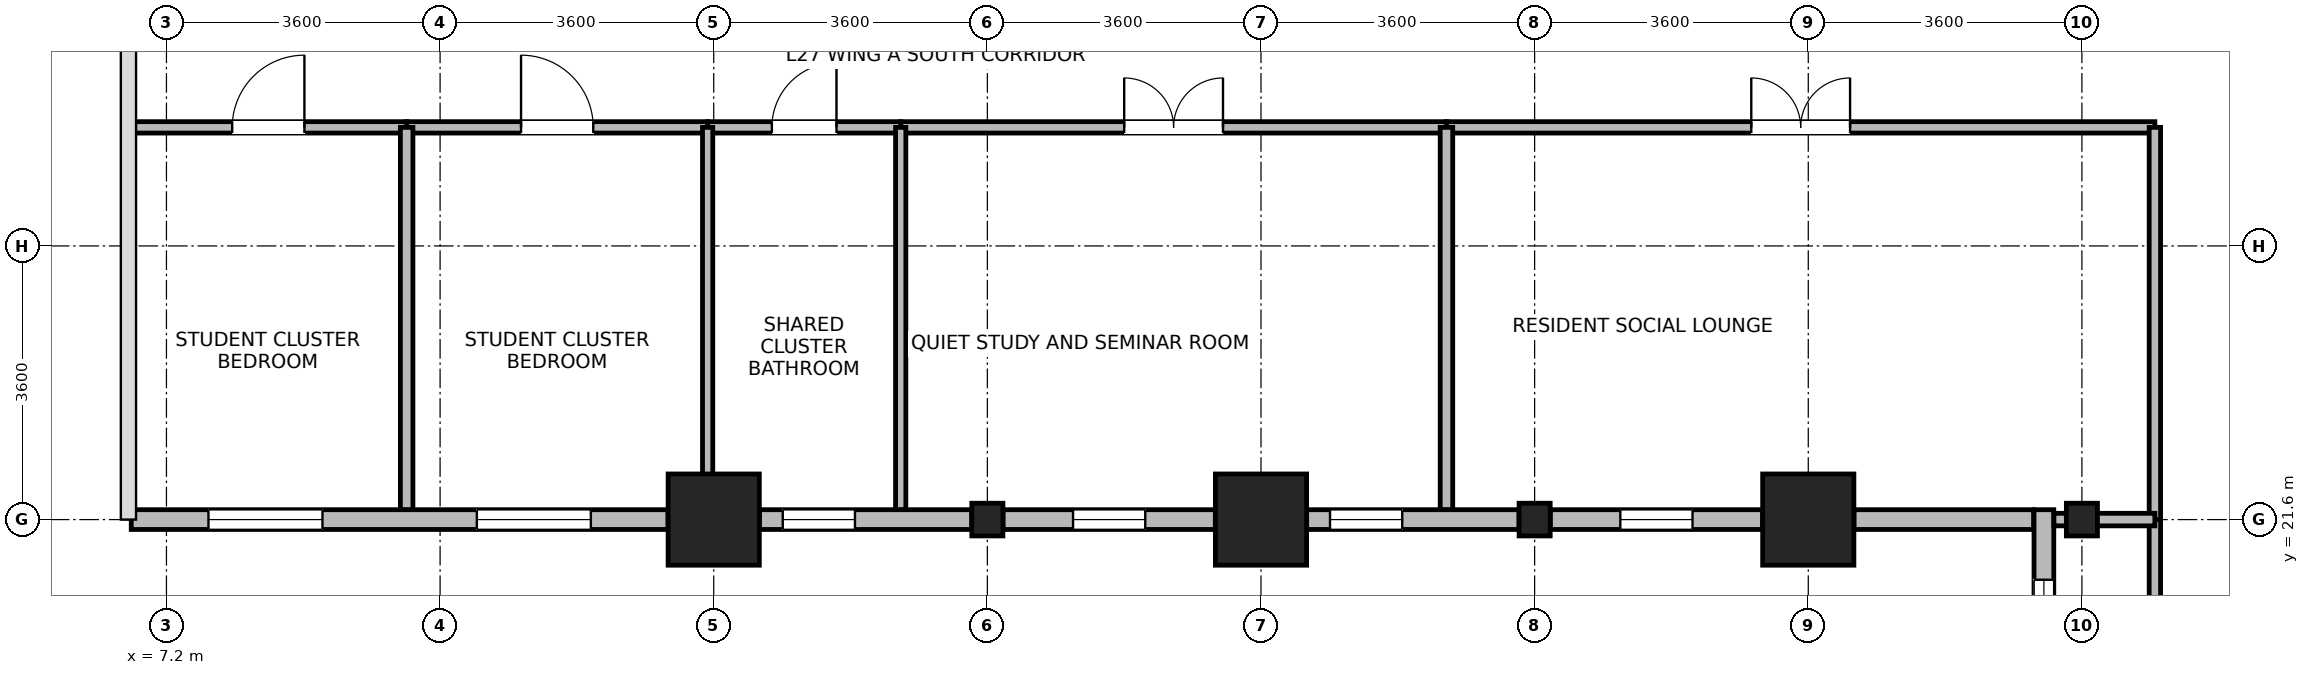
"""IFC4 building model, lengths in metres.
Left out: names, types, materials, properties, quantities, classifications, styles, units other than length and angle.
Written with IfcOpenShell. Run it as: python <this file> out.ifc"""

import sys

from ifc_helpers import new_model, si_unit, direction, frame, frame_2d, origin, origin_2d, place, context, subcontext, project, spatial, rectangle, i_section, extrude, source, transform, mapped, element, fill, save


model = new_model("IFC4")
c1 = context("Model", 3, precision=1e-05, world=origin(), true_north=direction((0.0, 1.0)))
c2 = subcontext(c1, "Body", "Model", "MODEL_VIEW")
j1 = project(units=[si_unit("LENGTHUNIT", "METRE"), si_unit("PLANEANGLEUNIT", "RADIAN")], contexts=[c1])
p1 = place(None, origin())
s1 = spatial("IfcSite", under=j1, at=p1, CompositionType="ELEMENT")
p2 = place(p1, origin())
s2 = spatial("IfcBuilding", under=s1, at=p2, CompositionType="ELEMENT")
p3 = place(p2, frame((0.0, 0.0, 108.2)))
s3 = spatial("IfcBuildingStorey", under=s2, at=p3, CompositionType="ELEMENT", Elevation=108.2)
m1 = source(origin(), c2, "Body", "SweptSolid", [
    extrude(rectangle(XDim=1.2, YDim=1.2, at=origin_2d()), origin(), (0.0, 0.0, 1.0), 3.7),
])
for number, where, z_axis, x_axis in (
    (1, (14.4, 21.6, 0.0), (0.0, 0.0, 1.0), (1.0, 0.0, 0.0)),
    (2, (21.6, 21.6, 0.0), (0.0, 0.0, 1.0), (1.0, 0.0, 0.0)),
    (3, (28.8, 21.6, 0.0), (0.0, 0.0, 1.0), (1.0, 0.0, 0.0)),
):
    element("IfcColumn", number, at=place(p3, frame(where, z_axis=z_axis, x_axis=x_axis)), inside=s3, PredefinedType="COLUMN", context=c2, shape_type="MappedRepresentation", body=[
        mapped(m1, transform((0.0, 0.0, 0.0), x_axis=(1.0, 0.0, 0.0), y_axis=(0.0, 1.0, 0.0), z_axis=(0.0, 0.0, 1.0), scale=1.0)),
    ])
m2 = source(origin(), c2, "Body", "SweptSolid", [
    extrude(i_section(OverallWidth=0.409, OverallDepth=0.43, WebThickness=0.024, FlangeThickness=0.033, FilletRadius=0.015, at=origin_2d()), origin(), (0.0, 0.0, 1.0), 3.7),
])
for number, where, z_axis, x_axis in (
    (4, (18.0, 21.6, 0.0), (0.0, 0.0, 1.0), (1.0, 0.0, 0.0)),
    (5, (25.2, 21.6, 0.0), (0.0, 0.0, 1.0), (1.0, 0.0, 0.0)),
    (6, (32.4, 21.6, 0.0), (0.0, 0.0, 1.0), (1.0, 0.0, 0.0)),
):
    element("IfcColumn", number, at=place(p3, frame(where, z_axis=z_axis, x_axis=x_axis)), inside=s3, PredefinedType="COLUMN", context=c2, shape_type="MappedRepresentation", body=[
        mapped(m2, transform((0.0, 0.0, 0.0), x_axis=(1.0, 0.0, 0.0), y_axis=(0.0, 1.0, 0.0), z_axis=(0.0, 0.0, 1.0), scale=1.0)),
    ])
p4 = place(p3, frame((13.799, 21.6, 0.0), z_axis=(0.0, 0.0, 1.0), x_axis=(-1.0, 0.0, 0.0)))
e7 = element("IfcWall", 7, at=p4, inside=s3, PredefinedType="STANDARD", context=c2, shape_type="SweptSolid", body=[
    extrude(rectangle(XDim=7.062, YDim=0.26, at=frame_2d((3.531, 0.0))), origin(), (0.0, 0.0, 1.0), 3.43),
])
p5 = place(p4, frame((1.015, 0.0, 0.85)))
e8 = element("IfcOpeningElement", 8, at=p5, cuts=e7, PredefinedType="OPENING", context=c2, shape_type="SweptSolid", body=[
    extrude(rectangle(XDim=1.5, YDim=1.85, at=frame_2d((0.75, 0.925))), frame((0.0, 0.14, 0.0), z_axis=(0.0, -1.0, 0.0), x_axis=(1.0, 0.0, 0.0)), (0.0, 0.0, 1.0), 0.28),
])
p6 = place(p4, frame((4.546, 0.0, 0.85)))
e9 = element("IfcOpeningElement", 9, at=p6, cuts=e7, PredefinedType="OPENING", context=c2, shape_type="SweptSolid", body=[
    extrude(rectangle(XDim=1.5, YDim=1.85, at=frame_2d((0.75, 0.925))), frame((0.0, 0.14, 0.0), z_axis=(0.0, -1.0, 0.0), x_axis=(1.0, 0.0, 0.0)), (0.0, 0.0, 1.0), 0.28),
])
p7 = place(p3, frame((17.794, 21.6, 0.0), z_axis=(0.0, 0.0, 1.0), x_axis=(-1.0, 0.0, 0.0)))
e10 = element("IfcWall", 10, at=p7, inside=s3, PredefinedType="STANDARD", context=c2, shape_type="SweptSolid", body=[
    extrude(rectangle(XDim=2.793, YDim=0.26, at=frame_2d((1.397, 0.0))), origin(), (0.0, 0.0, 1.0), 2.98),
])
p8 = place(p7, frame((1.536, 0.0, 0.85)))
e11 = element("IfcOpeningElement", 11, at=p8, cuts=e10, PredefinedType="OPENING", context=c2, shape_type="SweptSolid", body=[
    extrude(rectangle(XDim=0.95, YDim=1.75, at=frame_2d((0.475, 0.875))), frame((0.0, 0.14, 0.0), z_axis=(0.0, -1.0, 0.0), x_axis=(1.0, 0.0, 0.0)), (0.0, 0.0, 1.0), 0.28),
])
p9 = place(p3, frame((20.999, 21.6, 0.0), z_axis=(0.0, 0.0, 1.0), x_axis=(-1.0, 0.0, 0.0)))
e12 = element("IfcWall", 12, at=p9, inside=s3, PredefinedType="STANDARD", context=c2, shape_type="SweptSolid", body=[
    extrude(rectangle(XDim=2.793, YDim=0.26, at=frame_2d((1.397, 0.0))), origin(), (0.0, 0.0, 1.0), 2.98),
])
p10 = place(p9, frame((0.922, 0.0, 0.85)))
e13 = element("IfcOpeningElement", 13, at=p10, cuts=e12, PredefinedType="OPENING", context=c2, shape_type="SweptSolid", body=[
    extrude(rectangle(XDim=0.95, YDim=1.75, at=frame_2d((0.475, 0.875))), frame((0.0, 0.14, 0.0), z_axis=(0.0, -1.0, 0.0), x_axis=(1.0, 0.0, 0.0)), (0.0, 0.0, 1.0), 0.28),
])
p11 = place(p3, frame((24.994, 21.6, 0.0), z_axis=(0.0, 0.0, 1.0), x_axis=(-1.0, 0.0, 0.0)))
e14 = element("IfcWall", 14, at=p11, inside=s3, PredefinedType="STANDARD", context=c2, shape_type="SweptSolid", body=[
    extrude(rectangle(XDim=2.793, YDim=0.26, at=frame_2d((1.397, 0.0))), origin(), (0.0, 0.0, 1.0), 2.98),
])
p12 = place(p11, frame((1.536, 0.0, 0.85)))
e15 = element("IfcOpeningElement", 15, at=p12, cuts=e14, PredefinedType="OPENING", context=c2, shape_type="SweptSolid", body=[
    extrude(rectangle(XDim=0.95, YDim=1.75, at=frame_2d((0.475, 0.875))), frame((0.0, 0.14, 0.0), z_axis=(0.0, -1.0, 0.0), x_axis=(1.0, 0.0, 0.0)), (0.0, 0.0, 1.0), 0.28),
])
p13 = place(p3, frame((28.199, 21.6, 0.0), z_axis=(0.0, 0.0, 1.0), x_axis=(-1.0, 0.0, 0.0)))
e16 = element("IfcWall", 16, at=p13, inside=s3, PredefinedType="STANDARD", context=c2, shape_type="SweptSolid", body=[
    extrude(rectangle(XDim=2.793, YDim=0.26, at=frame_2d((1.397, 0.0))), origin(), (0.0, 0.0, 1.0), 2.98),
])
p14 = place(p13, frame((0.922, 0.0, 0.85)))
e17 = element("IfcOpeningElement", 17, at=p14, cuts=e16, PredefinedType="OPENING", context=c2, shape_type="SweptSolid", body=[
    extrude(rectangle(XDim=0.95, YDim=1.75, at=frame_2d((0.475, 0.875))), frame((0.0, 0.14, 0.0), z_axis=(0.0, -1.0, 0.0), x_axis=(1.0, 0.0, 0.0)), (0.0, 0.0, 1.0), 0.28),
])
p15 = place(p3, frame((31.765, 21.6, 0.0), z_axis=(0.0, 0.0, 1.0), x_axis=(-1.0, 0.0, 0.0)))
e18 = element("IfcWall", 18, at=p15, inside=s3, PredefinedType="STANDARD", context=c2, shape_type="SweptSolid", body=[
    extrude(rectangle(XDim=2.364, YDim=0.26, at=frame_2d((1.182, 0.0))), origin(), (0.0, 0.0, 1.0), 2.98),
])
p16 = place(p3, frame((31.9, 1.67, 0.0), z_axis=(0.0, 0.0, 1.0), x_axis=(0.0, 1.0, 0.0)))
e19 = element("IfcWall", 19, at=p16, inside=s3, PredefinedType="STANDARD", context=c2, shape_type="SweptSolid", body=[
    extrude(rectangle(XDim=20.06, YDim=0.26, at=frame_2d((10.03, 0.0))), origin(), (0.0, 0.0, 1.0), 3.43),
])
p17 = place(p16, frame((0.922, 0.0, 0.85)))
e20 = element("IfcOpeningElement", 20, at=p17, cuts=e19, PredefinedType="OPENING", context=c2, shape_type="SweptSolid", body=[
    extrude(rectangle(XDim=1.5, YDim=1.85, at=frame_2d((0.75, 0.925))), frame((0.0, 0.14, 0.0), z_axis=(0.0, -1.0, 0.0), x_axis=(1.0, 0.0, 0.0)), (0.0, 0.0, 1.0), 0.28),
])
p18 = place(p16, frame((7.608, 0.0, 0.85)))
e21 = element("IfcOpeningElement", 21, at=p18, cuts=e19, PredefinedType="OPENING", context=c2, shape_type="SweptSolid", body=[
    extrude(rectangle(XDim=1.5, YDim=1.85, at=frame_2d((0.75, 0.925))), frame((0.0, 0.14, 0.0), z_axis=(0.0, -1.0, 0.0), x_axis=(1.0, 0.0, 0.0)), (0.0, 0.0, 1.0), 0.28),
])
p19 = place(p16, frame((10.952, 0.0, 0.85)))
e22 = element("IfcOpeningElement", 22, at=p19, cuts=e19, PredefinedType="OPENING", context=c2, shape_type="SweptSolid", body=[
    extrude(rectangle(XDim=1.5, YDim=1.85, at=frame_2d((0.75, 0.925))), frame((0.0, 0.14, 0.0), z_axis=(0.0, -1.0, 0.0), x_axis=(1.0, 0.0, 0.0)), (0.0, 0.0, 1.0), 0.28),
])
p20 = place(p16, frame((14.295, 0.0, 0.85)))
e23 = element("IfcOpeningElement", 23, at=p20, cuts=e19, PredefinedType="OPENING", context=c2, shape_type="SweptSolid", body=[
    extrude(rectangle(XDim=1.5, YDim=1.85, at=frame_2d((0.75, 0.925))), frame((0.0, 0.14, 0.0), z_axis=(0.0, -1.0, 0.0), x_axis=(1.0, 0.0, 0.0)), (0.0, 0.0, 1.0), 0.28),
])
p21 = place(p16, frame((17.638, 0.0, 0.85)))
e24 = element("IfcOpeningElement", 24, at=p21, cuts=e19, PredefinedType="OPENING", context=c2, shape_type="SweptSolid", body=[
    extrude(rectangle(XDim=1.5, YDim=1.85, at=frame_2d((0.75, 0.925))), frame((0.0, 0.14, 0.0), z_axis=(0.0, -1.0, 0.0), x_axis=(1.0, 0.0, 0.0)), (0.0, 0.0, 1.0), 0.28),
])
p22 = place(p3, frame((24.04, 26.76, 0.0), z_axis=(0.0, 0.0, 1.0), x_axis=(1.0, 0.0, 0.0)))
e25 = element("IfcWall", 25, at=p22, inside=s3, PredefinedType="PARTITIONING", context=c2, shape_type="SweptSolid", body=[
    extrude(rectangle(XDim=9.32, YDim=0.15, at=frame_2d((4.66, 0.0))), origin(), (0.0, 0.0, 1.0), 3.43),
])
p23 = place(p22, frame((4.01, 0.0, 0.0)))
e26 = element("IfcOpeningElement", 26, at=p23, cuts=e25, PredefinedType="OPENING", context=c2, shape_type="SweptSolid", body=[
    extrude(rectangle(XDim=1.3, YDim=2.12, at=frame_2d((0.65, 1.06))), frame((0.0, 0.085, 0.0), z_axis=(0.0, -1.0, 0.0), x_axis=(1.0, 0.0, 0.0)), (0.0, 0.0, 1.0), 0.17),
])
p24 = place(p3, frame((16.86, 26.76, 0.0), z_axis=(0.0, 0.0, 1.0), x_axis=(1.0, 0.0, 0.0)))
e27 = element("IfcWall", 27, at=p24, inside=s3, PredefinedType="PARTITIONING", context=c2, shape_type="SweptSolid", body=[
    extrude(rectangle(XDim=7.18, YDim=0.15, at=frame_2d((3.59, 0.0))), origin(), (0.0, 0.0, 1.0), 3.43),
])
p25 = place(p24, frame((2.94, 0.0, 0.0)))
e28 = element("IfcOpeningElement", 28, at=p25, cuts=e27, PredefinedType="OPENING", context=c2, shape_type="SweptSolid", body=[
    extrude(rectangle(XDim=1.3, YDim=2.12, at=frame_2d((0.65, 1.06))), frame((0.0, 0.085, 0.0), z_axis=(0.0, -1.0, 0.0), x_axis=(1.0, 0.0, 0.0)), (0.0, 0.0, 1.0), 0.17),
])
p26 = place(p3, frame((33.36, 14.5, 0.0), z_axis=(0.0, 0.0, 1.0), x_axis=(0.0, 1.0, 0.0)))
e29 = element("IfcWall", 29, at=p26, inside=s3, PredefinedType="PARTITIONING", context=c2, shape_type="SweptSolid", body=[
    extrude(rectangle(XDim=7.1, YDim=0.15, at=frame_2d((3.55, 0.0))), origin(), (0.0, 0.0, 1.0), 3.43),
])
p27 = place(p26, frame((2.9, 0.0, 0.0)))
e30 = element("IfcOpeningElement", 30, at=p27, cuts=e29, PredefinedType="OPENING", context=c2, shape_type="SweptSolid", body=[
    extrude(rectangle(XDim=1.3, YDim=2.12, at=frame_2d((0.65, 1.06))), frame((0.0, 0.085, 0.0), z_axis=(0.0, -1.0, 0.0), x_axis=(1.0, 0.0, 0.0)), (0.0, 0.0, 1.0), 0.17),
])
p28 = place(p3, frame((33.36, 21.6, 0.0), z_axis=(0.0, 0.0, 1.0), x_axis=(0.0, 1.0, 0.0)))
e31 = element("IfcWall", 31, at=p28, inside=s3, PredefinedType="PARTITIONING", context=c2, shape_type="SweptSolid", body=[
    extrude(rectangle(XDim=5.16, YDim=0.15, at=frame_2d((2.58, 0.0))), origin(), (0.0, 0.0, 1.0), 3.43),
])
p29 = place(p3, frame((10.36, 26.76, 0.0), z_axis=(0.0, 0.0, 1.0), x_axis=(1.0, 0.0, 0.0)))
e32 = element("IfcWall", 32, at=p29, inside=s3, PredefinedType="PARTITIONING", context=c2, shape_type="SweptSolid", body=[
    extrude(rectangle(XDim=3.96, YDim=0.15, at=frame_2d((1.98, 0.0))), origin(), (0.0, 0.0, 1.0), 3.43),
])
p30 = place(p29, frame((1.505, 0.0, 0.0)))
e33 = element("IfcOpeningElement", 33, at=p30, cuts=e32, PredefinedType="OPENING", context=c2, shape_type="SweptSolid", body=[
    extrude(rectangle(XDim=0.95, YDim=2.1, at=frame_2d((0.475, 1.05))), frame((0.0, 0.085, 0.0), z_axis=(0.0, -1.0, 0.0), x_axis=(1.0, 0.0, 0.0)), (0.0, 0.0, 1.0), 0.17),
])
p31 = place(p3, frame((6.72, 26.76, 0.0), z_axis=(0.0, 0.0, 1.0), x_axis=(1.0, 0.0, 0.0)))
e34 = element("IfcWall", 34, at=p31, inside=s3, PredefinedType="PARTITIONING", context=c2, shape_type="SweptSolid", body=[
    extrude(rectangle(XDim=3.64, YDim=0.15, at=frame_2d((1.82, 0.0))), origin(), (0.0, 0.0, 1.0), 3.43),
])
p32 = place(p31, frame((1.345, 0.0, 0.0)))
e35 = element("IfcOpeningElement", 35, at=p32, cuts=e34, PredefinedType="OPENING", context=c2, shape_type="SweptSolid", body=[
    extrude(rectangle(XDim=0.95, YDim=2.1, at=frame_2d((0.475, 1.05))), frame((0.0, 0.085, 0.0), z_axis=(0.0, -1.0, 0.0), x_axis=(1.0, 0.0, 0.0)), (0.0, 0.0, 1.0), 0.17),
])
p33 = place(p3, frame((14.32, 26.76, 0.0), z_axis=(0.0, 0.0, 1.0), x_axis=(1.0, 0.0, 0.0)))
e36 = element("IfcWall", 36, at=p33, inside=s3, PredefinedType="PARTITIONING", context=c2, shape_type="SweptSolid", body=[
    extrude(rectangle(XDim=2.54, YDim=0.15, at=frame_2d((1.27, 0.0))), origin(), (0.0, 0.0, 1.0), 3.43),
])
p34 = place(p33, frame((0.845, 0.0, 0.0)))
e37 = element("IfcOpeningElement", 37, at=p34, cuts=e36, PredefinedType="OPENING", context=c2, shape_type="SweptSolid", body=[
    extrude(rectangle(XDim=0.85, YDim=2.04, at=frame_2d((0.425, 1.02))), frame((0.0, 0.085, 0.0), z_axis=(0.0, -1.0, 0.0), x_axis=(1.0, 0.0, 0.0)), (0.0, 0.0, 1.0), 0.17),
])
p35 = place(p3, frame((10.36, 21.732, 0.0), z_axis=(0.0, 0.0, 1.0), x_axis=(0.0, 1.0, 0.0)))
e38 = element("IfcWall", 38, at=p35, inside=s3, PredefinedType="PARTITIONING", context=c2, shape_type="SweptSolid", body=[
    extrude(rectangle(XDim=5.028, YDim=0.165, at=frame_2d((2.514, 0.0))), origin(), (0.0, 0.0, 1.0), 3.43),
])
p36 = place(p3, frame((14.32, 21.732, 0.0), z_axis=(0.0, 0.0, 1.0), x_axis=(0.0, 1.0, 0.0)))
e39 = element("IfcWall", 39, at=p36, inside=s3, PredefinedType="PARTITIONING", context=c2, shape_type="SweptSolid", body=[
    extrude(rectangle(XDim=5.028, YDim=0.135, at=frame_2d((2.514, 0.0))), origin(), (0.0, 0.0, 1.0), 2.93),
])
p37 = place(p3, frame((16.86, 21.732, 0.0), z_axis=(0.0, 0.0, 1.0), x_axis=(0.0, 1.0, 0.0)))
e40 = element("IfcWall", 40, at=p37, inside=s3, PredefinedType="PARTITIONING", context=c2, shape_type="SweptSolid", body=[
    extrude(rectangle(XDim=5.028, YDim=0.135, at=frame_2d((2.514, 0.0))), origin(), (0.0, 0.0, 1.0), 3.43),
])
p38 = place(p3, frame((24.04, 21.732, 0.0), z_axis=(0.0, 0.0, 1.0), x_axis=(0.0, 1.0, 0.0)))
e41 = element("IfcWall", 41, at=p38, inside=s3, PredefinedType="PARTITIONING", context=c2, shape_type="SweptSolid", body=[
    extrude(rectangle(XDim=5.028, YDim=0.165, at=frame_2d((2.514, 0.0))), origin(), (0.0, 0.0, 1.0), 3.43),
])
p39 = place(p3, frame((32.032, 21.6, 0.0), z_axis=(0.0, 0.0, 1.0), x_axis=(1.0, 0.0, 0.0)))
e42 = element("IfcWall", 42, at=p39, inside=s3, PredefinedType="PARTITIONING", context=c2, shape_type="SweptSolid", body=[
    extrude(rectangle(XDim=1.328, YDim=0.165, at=frame_2d((0.664, 0.0))), origin(), (0.0, 0.0, 1.0), 2.98),
])
p40 = place(p5, origin())
e43 = element("IfcWindow", 43, at=p40, inside=s3, PartitioningType="SINGLE_PANEL", PredefinedType="WINDOW", context=c2, shape_type="SweptSolid", body=[
    extrude(rectangle(XDim=1.5, YDim=1.85, at=frame_2d((0.75, 0.925))), frame((0.0, 0.03, 0.0), z_axis=(0.0, -1.0, 0.0), x_axis=(1.0, 0.0, 0.0)), (0.0, 0.0, 1.0), 0.06),
])
fill(e8, e43)
p41 = place(p6, origin())
e44 = element("IfcWindow", 44, at=p41, inside=s3, PartitioningType="SINGLE_PANEL", PredefinedType="WINDOW", context=c2, shape_type="SweptSolid", body=[
    extrude(rectangle(XDim=1.5, YDim=1.85, at=frame_2d((0.75, 0.925))), frame((0.0, 0.03, 0.0), z_axis=(0.0, -1.0, 0.0), x_axis=(1.0, 0.0, 0.0)), (0.0, 0.0, 1.0), 0.06),
])
fill(e9, e44)
p42 = place(p8, origin())
e45 = element("IfcWindow", 45, at=p42, inside=s3, PartitioningType="SINGLE_PANEL", PredefinedType="WINDOW", context=c2, shape_type="SweptSolid", body=[
    extrude(rectangle(XDim=0.95, YDim=1.75, at=frame_2d((0.475, 0.875))), frame((0.0, 0.03, 0.0), z_axis=(0.0, -1.0, 0.0), x_axis=(1.0, 0.0, 0.0)), (0.0, 0.0, 1.0), 0.06),
])
fill(e11, e45)
p43 = place(p10, origin())
e46 = element("IfcWindow", 46, at=p43, inside=s3, PartitioningType="SINGLE_PANEL", PredefinedType="WINDOW", context=c2, shape_type="SweptSolid", body=[
    extrude(rectangle(XDim=0.95, YDim=1.75, at=frame_2d((0.475, 0.875))), frame((0.0, 0.03, 0.0), z_axis=(0.0, -1.0, 0.0), x_axis=(1.0, 0.0, 0.0)), (0.0, 0.0, 1.0), 0.06),
])
fill(e13, e46)
p44 = place(p12, origin())
e47 = element("IfcWindow", 47, at=p44, inside=s3, PartitioningType="SINGLE_PANEL", PredefinedType="WINDOW", context=c2, shape_type="SweptSolid", body=[
    extrude(rectangle(XDim=0.95, YDim=1.75, at=frame_2d((0.475, 0.875))), frame((0.0, 0.03, 0.0), z_axis=(0.0, -1.0, 0.0), x_axis=(1.0, 0.0, 0.0)), (0.0, 0.0, 1.0), 0.06),
])
fill(e15, e47)
p45 = place(p14, origin())
e48 = element("IfcWindow", 48, at=p45, inside=s3, PartitioningType="SINGLE_PANEL", PredefinedType="WINDOW", context=c2, shape_type="SweptSolid", body=[
    extrude(rectangle(XDim=0.95, YDim=1.75, at=frame_2d((0.475, 0.875))), frame((0.0, 0.03, 0.0), z_axis=(0.0, -1.0, 0.0), x_axis=(1.0, 0.0, 0.0)), (0.0, 0.0, 1.0), 0.06),
])
fill(e17, e48)
p46 = place(p21, origin())
e49 = element("IfcWindow", 49, at=p46, inside=s3, PartitioningType="SINGLE_PANEL", PredefinedType="WINDOW", context=c2, shape_type="SweptSolid", body=[
    extrude(rectangle(XDim=1.5, YDim=1.85, at=frame_2d((0.75, 0.925))), frame((0.0, 0.03, 0.0), z_axis=(0.0, -1.0, 0.0), x_axis=(1.0, 0.0, 0.0)), (0.0, 0.0, 1.0), 0.06),
])
fill(e24, e49)
p47 = place(p23, origin())
e50 = element("IfcDoor", 50, at=p47, inside=s3, OperationType="DOUBLE_DOOR_SINGLE_SWING", PredefinedType="DOOR", context=c2, shape_type="SweptSolid", body=[
    extrude(rectangle(XDim=1.3, YDim=2.12, at=frame_2d((0.65, 1.06))), frame((0.0, 0.025, 0.0), z_axis=(0.0, -1.0, 0.0), x_axis=(1.0, 0.0, 0.0)), (0.0, 0.0, 1.0), 0.05),
])
fill(e26, e50)
p48 = place(p25, origin())
e51 = element("IfcDoor", 51, at=p48, inside=s3, OperationType="DOUBLE_DOOR_SINGLE_SWING", PredefinedType="DOOR", context=c2, shape_type="SweptSolid", body=[
    extrude(rectangle(XDim=1.3, YDim=2.12, at=frame_2d((0.65, 1.06))), frame((0.0, 0.025, 0.0), z_axis=(0.0, -1.0, 0.0), x_axis=(1.0, 0.0, 0.0)), (0.0, 0.0, 1.0), 0.05),
])
fill(e28, e51)
p49 = place(p30, origin())
e52 = element("IfcDoor", 52, at=p49, inside=s3, OperationType="SINGLE_SWING_LEFT", PredefinedType="DOOR", context=c2, shape_type="SweptSolid", body=[
    extrude(rectangle(XDim=0.95, YDim=2.1, at=frame_2d((0.475, 1.05))), frame((0.0, 0.025, 0.0), z_axis=(0.0, -1.0, 0.0), x_axis=(1.0, 0.0, 0.0)), (0.0, 0.0, 1.0), 0.05),
])
fill(e33, e52)
p50 = place(p32, origin())
e53 = element("IfcDoor", 53, at=p50, inside=s3, OperationType="SINGLE_SWING_RIGHT", PredefinedType="DOOR", context=c2, shape_type="SweptSolid", body=[
    extrude(rectangle(XDim=0.95, YDim=2.1, at=frame_2d((0.475, 1.05))), frame((0.0, 0.025, 0.0), z_axis=(0.0, -1.0, 0.0), x_axis=(1.0, 0.0, 0.0)), (0.0, 0.0, 1.0), 0.05),
])
fill(e35, e53)
p51 = place(p34, origin())
e54 = element("IfcDoor", 54, at=p51, inside=s3, OperationType="SINGLE_SWING_RIGHT", PredefinedType="DOOR", context=c2, shape_type="SweptSolid", body=[
    extrude(rectangle(XDim=0.85, YDim=2.04, at=frame_2d((0.425, 1.02))), frame((0.0, 0.025, 0.0), z_axis=(0.0, -1.0, 0.0), x_axis=(1.0, 0.0, 0.0)), (0.0, 0.0, 1.0), 0.05),
])
fill(e37, e54)
save(model, sys.argv[1])
